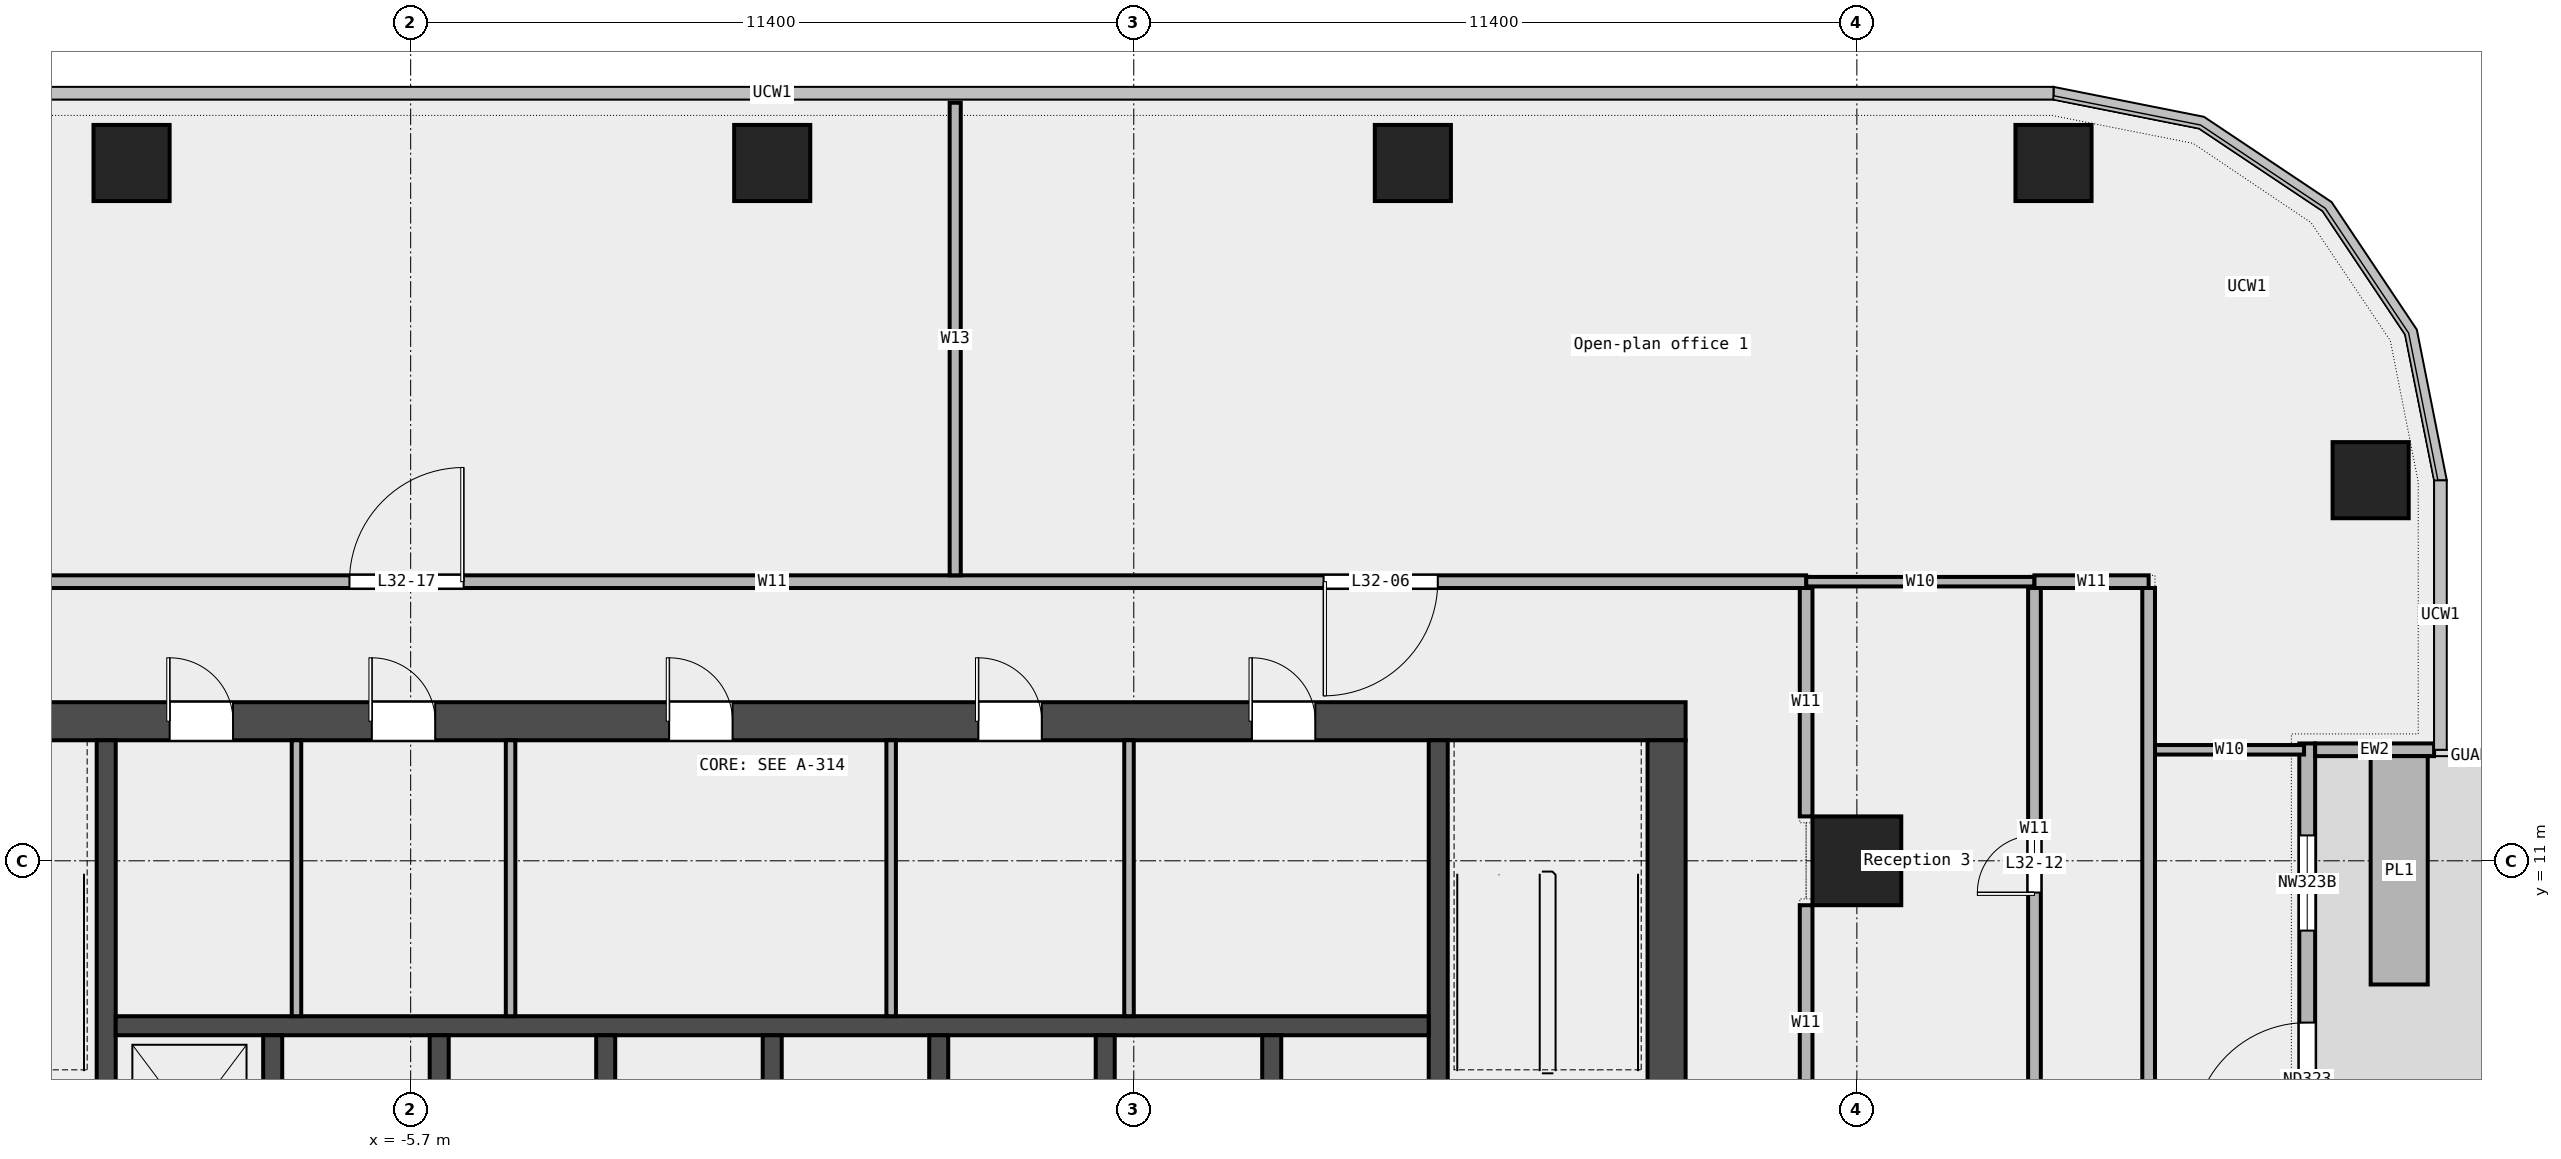
"""IFC4 building model, lengths in metres.
Left out: names, types, materials, properties, quantities, classifications, styles, units other than length and angle.
Written with IfcOpenShell. Run it as: python <this file> out.ifc"""

import sys

from ifc_helpers import new_model, si_unit, direction, frame, frame_2d, origin, origin_2d, place, context, subcontext, project, spatial, rectangle, extrude, element, fill, save


model = new_model("IFC4")
c1 = context("Model", 3, precision=1e-05, world=origin(), true_north=direction((0.0, 1.0)))
c2 = subcontext(c1, "Body", "Model", "MODEL_VIEW")
j1 = project(units=[si_unit("LENGTHUNIT", "METRE"), si_unit("PLANEANGLEUNIT", "RADIAN")], contexts=[c1])
p1 = place(None, origin())
s1 = spatial("IfcSite", under=j1, at=p1, CompositionType="ELEMENT")
p2 = place(p1, origin())
s2 = spatial("IfcBuilding", under=s1, at=p2, CompositionType="ELEMENT")
p3 = place(p2, frame((0.0, 0.0, 161.0)))
s3 = spatial("IfcBuildingStorey", under=s2, at=p3, CompositionType="ELEMENT", Elevation=161.0)
for number, where, z_axis, x_axis in (
    (1, (25.2, 17.0, 0.0), (0.0, 0.0, 1.0), (1.0, 0.0, 0.0)),
    (2, (20.2, 22.0, 0.0), (0.0, 0.0, 1.0), (1.0, 0.0, 0.0)),
    (3, (10.1, 22.0, 0.0), (0.0, 0.0, 1.0), (1.0, 0.0, 0.0)),
    (4, (0.0, 22.0, 0.0), (0.0, 0.0, 1.0), (1.0, 0.0, 0.0)),
    (5, (-10.1, 22.0, 0.0), (0.0, 0.0, 1.0), (1.0, 0.0, 0.0)),
):
    element("IfcColumn", number, at=place(p3, frame(where, z_axis=z_axis, x_axis=x_axis)), inside=s3, PredefinedType="COLUMN", context=c2, shape_type="SweptSolid", body=[
        extrude(rectangle(XDim=1.2, YDim=1.2, at=origin_2d()), origin(), (0.0, 0.0, 1.0), 3.6),
    ])
p4 = place(p3, frame((17.1, 11.0, 0.0), z_axis=(0.0, 0.0, 1.0), x_axis=(1.0, 0.0, 0.0)))
e6 = element("IfcColumn", 6, at=p4, inside=s3, PredefinedType="COLUMN", context=c2, shape_type="SweptSolid", body=[
    extrude(rectangle(XDim=1.4, YDim=1.4, at=origin_2d()), origin(), (0.0, 0.0, 1.0), 3.6),
])
p5 = place(p3, frame((24.2, -0.1, 0.0), z_axis=(0.0, 0.0, 1.0), x_axis=(0.0, 1.0, 0.0)))
e7 = element("IfcWall", 7, at=p5, inside=s3, PredefinedType="STANDARD", context=c2, shape_type="SweptSolid", body=[
    extrude(rectangle(XDim=12.95, YDim=0.25, at=frame_2d((6.475, 0.0))), origin(), (0.0, 0.0, 1.0), 3.6),
])
p6 = place(p5, frame((1.5, 0.0, 0.45)))
e8 = element("IfcOpeningElement", 8, at=p6, cuts=e7, PredefinedType="OPENING", context=c2, shape_type="SweptSolid", body=[
    extrude(rectangle(XDim=1.5, YDim=2.4, at=frame_2d((0.75, 1.2))), frame((0.0, 0.137, 0.0), z_axis=(0.0, -1.0, 0.0), x_axis=(1.0, 0.0, 0.0)), (0.0, 0.0, 1.0), 0.274),
])
p7 = place(p5, frame((6.75, 0.0, 0.0)))
e9 = element("IfcOpeningElement", 9, at=p7, cuts=e7, PredefinedType="OPENING", context=c2, shape_type="SweptSolid", body=[
    extrude(rectangle(XDim=1.8, YDim=2.4, at=frame_2d((0.9, 1.2))), frame((0.0, 0.137, 0.0), z_axis=(0.0, -1.0, 0.0), x_axis=(1.0, 0.0, 0.0)), (0.0, 0.0, 1.0), 0.274),
])
p8 = place(p5, frame((10.0, 0.0, 0.45)))
e10 = element("IfcOpeningElement", 10, at=p8, cuts=e7, PredefinedType="OPENING", context=c2, shape_type="SweptSolid", body=[
    extrude(rectangle(XDim=1.5, YDim=2.4, at=frame_2d((0.75, 1.2))), frame((0.0, 0.137, 0.0), z_axis=(0.0, -1.0, 0.0), x_axis=(1.0, 0.0, 0.0)), (0.0, 0.0, 1.0), 0.274),
])
p9 = place(p3, frame((26.2, 12.75, 0.0), z_axis=(0.0, 0.0, 1.0), x_axis=(-1.0, 0.0, 0.0)))
e11 = element("IfcWall", 11, at=p9, inside=s3, PredefinedType="STANDARD", context=c2, shape_type="SweptSolid", body=[
    extrude(rectangle(XDim=1.875, YDim=0.2, at=frame_2d((0.938, 0.0))), origin(), (0.0, 0.0, 1.0), 3.6),
])
p10 = place(p3, frame((25.65, 9.05, 0.0), z_axis=(0.0, 0.0, 1.0), x_axis=(0.0, 1.0, 0.0)))
e12 = element("IfcWall", 12, at=p10, inside=s3, PredefinedType="STANDARD", context=c2, shape_type="SweptSolid", body=[
    extrude(rectangle(XDim=3.6, YDim=0.9, at=frame_2d((1.8, 0.0))), origin(), (0.0, 0.0, 1.0), 0.7),
])
p11 = place(p3, frame((21.8, 12.75, 0.0), z_axis=(0.0, 0.0, 1.0), x_axis=(1.0, 0.0, 0.0)))
e13 = element("IfcWall", 13, at=p11, inside=s3, PredefinedType="PARTITIONING", context=c2, shape_type="SweptSolid", body=[
    extrude(rectangle(XDim=2.35, YDim=0.15, at=frame_2d((1.175, 0.0))), origin(), (0.0, 0.0, 1.0), 3.6),
])
p12 = place(p3, frame((16.3, 15.4, 0.0), z_axis=(0.0, 0.0, 1.0), x_axis=(1.0, 0.0, 0.0)))
e14 = element("IfcWall", 14, at=p12, inside=s3, PredefinedType="PARTITIONING", context=c2, shape_type="SweptSolid", body=[
    extrude(rectangle(XDim=3.6, YDim=0.15, at=frame_2d((1.8, 0.0))), origin(), (0.0, 0.0, 1.0), 3.6),
])
p13 = place(p3, frame((-16.3, 15.4, 0.0), z_axis=(0.0, 0.0, 1.0), x_axis=(1.0, 0.0, 0.0)))
e15 = element("IfcWall", 15, at=p13, inside=s3, PredefinedType="PARTITIONING", context=c2, shape_type="SweptSolid", body=[
    extrude(rectangle(XDim=32.6, YDim=0.2, at=frame_2d((16.3, 0.0))), origin(), (0.0, 0.0, 1.0), 3.6),
])
p14 = place(p13, frame((24.992, 0.0, 0.0)))
e16 = element("IfcOpeningElement", 16, at=p14, cuts=e15, PredefinedType="OPENING", context=c2, shape_type="SweptSolid", body=[
    extrude(rectangle(XDim=1.8, YDim=2.1, at=frame_2d((0.9, 1.05))), frame((0.0, 0.112, 0.0), z_axis=(0.0, -1.0, 0.0), x_axis=(1.0, 0.0, 0.0)), (0.0, 0.0, 1.0), 0.224),
])
p15 = place(p13, frame((9.635, 0.0, 0.0)))
e17 = element("IfcOpeningElement", 17, at=p15, cuts=e15, PredefinedType="OPENING", context=c2, shape_type="SweptSolid", body=[
    extrude(rectangle(XDim=1.8, YDim=2.1, at=frame_2d((0.9, 1.05))), frame((0.0, 0.112, 0.0), z_axis=(0.0, -1.0, 0.0), x_axis=(1.0, 0.0, 0.0)), (0.0, 0.0, 1.0), 0.224),
])
p16 = place(p3, frame((19.9, 15.4, 0.0), z_axis=(0.0, 0.0, 1.0), x_axis=(1.0, 0.0, 0.0)))
e18 = element("IfcWall", 18, at=p16, inside=s3, PredefinedType="PARTITIONING", context=c2, shape_type="SweptSolid", body=[
    extrude(rectangle(XDim=1.8, YDim=0.2, at=frame_2d((0.9, 0.0))), origin(), (0.0, 0.0, 1.0), 3.6),
])
p17 = place(p3, frame((2.885, 15.5, 0.0), z_axis=(0.0, 0.0, 1.0), x_axis=(0.0, 1.0, 0.0)))
e19 = element("IfcWall", 19, at=p17, inside=s3, PredefinedType="PARTITIONING", context=c2, shape_type="SweptSolid", body=[
    extrude(rectangle(XDim=7.45, YDim=0.175, at=frame_2d((3.725, 0.0))), origin(), (0.0, 0.0, 1.0), 3.6),
])
p18 = place(p3, frame((16.3, 6.6, 0.0), z_axis=(0.0, 0.0, 1.0), x_axis=(0.0, 1.0, 0.0)))
e20 = element("IfcWall", 20, at=p18, inside=s3, PredefinedType="PARTITIONING", context=c2, shape_type="SweptSolid", body=[
    extrude(rectangle(XDim=3.7, YDim=0.2, at=frame_2d((1.85, 0.0))), origin(), (0.0, 0.0, 1.0), 3.6),
])
p19 = place(p3, frame((16.3, 11.7, 0.0), z_axis=(0.0, 0.0, 1.0), x_axis=(0.0, 1.0, 0.0)))
e21 = element("IfcWall", 21, at=p19, inside=s3, PredefinedType="PARTITIONING", context=c2, shape_type="SweptSolid", body=[
    extrude(rectangle(XDim=3.6, YDim=0.2, at=frame_2d((1.8, 0.0))), origin(), (0.0, 0.0, 1.0), 3.6),
])
p20 = place(p3, frame((19.9, 6.6, 0.0), z_axis=(0.0, 0.0, 1.0), x_axis=(0.0, 1.0, 0.0)))
e22 = element("IfcWall", 22, at=p20, inside=s3, PredefinedType="PARTITIONING", context=c2, shape_type="SweptSolid", body=[
    extrude(rectangle(XDim=8.7, YDim=0.2, at=frame_2d((4.35, 0.0))), origin(), (0.0, 0.0, 1.0), 3.6),
])
p21 = place(p20, frame((3.9, 0.0, 0.0)))
e23 = element("IfcOpeningElement", 23, at=p21, cuts=e22, PredefinedType="OPENING", context=c2, shape_type="SweptSolid", body=[
    extrude(rectangle(XDim=0.9, YDim=2.1, at=frame_2d((0.45, 1.05))), frame((0.0, 0.112, 0.0), z_axis=(0.0, -1.0, 0.0), x_axis=(1.0, 0.0, 0.0)), (0.0, 0.0, 1.0), 0.224),
])
p22 = place(p3, frame((21.7, -9.0, 0.0), z_axis=(0.0, 0.0, 1.0), x_axis=(0.0, 1.0, 0.0)))
e24 = element("IfcWall", 24, at=p22, inside=s3, PredefinedType="PARTITIONING", context=c2, shape_type="SweptSolid", body=[
    extrude(rectangle(XDim=24.3, YDim=0.2, at=frame_2d((12.15, 0.0))), origin(), (0.0, 0.0, 1.0), 3.6),
])
p23 = place(p22, frame((14.925, 0.0, 0.0)))
e25 = element("IfcOpeningElement", 25, at=p23, cuts=e24, PredefinedType="OPENING", context=c2, shape_type="SweptSolid", body=[
    extrude(rectangle(XDim=0.9, YDim=2.1, at=frame_2d((0.45, 1.05))), frame((0.0, 0.112, 0.0), z_axis=(0.0, -1.0, 0.0), x_axis=(1.0, 0.0, 0.0)), (0.0, 0.0, 1.0), 0.224),
])
p24 = place(p22, frame((2.562, 0.0, 0.0)))
e26 = element("IfcOpeningElement", 26, at=p24, cuts=e24, PredefinedType="OPENING", context=c2, shape_type="SweptSolid", body=[
    extrude(rectangle(XDim=0.9, YDim=2.1, at=frame_2d((0.45, 1.05))), frame((0.0, 0.112, 0.0), z_axis=(0.0, -1.0, 0.0), x_axis=(1.0, 0.0, 0.0)), (0.0, 0.0, 1.0), 0.224),
])
p25 = place(p3, frame((-14.4, 13.2, 0.0), z_axis=(0.0, 0.0, 1.0), x_axis=(1.0, 0.0, 0.0)))
e27 = element("IfcWall", 27, at=p25, inside=s3, PredefinedType="SHEAR", context=c2, shape_type="SweptSolid", body=[
    extrude(rectangle(XDim=28.8, YDim=0.6, at=frame_2d((14.4, 0.0))), origin(), (0.0, 0.0, 1.0), 3.7),
])
p26 = place(p25, frame((4.9, 0.0, 0.0)))
e28 = element("IfcOpeningElement", 28, at=p26, cuts=e27, PredefinedType="OPENING", context=c2, shape_type="SweptSolid", body=[
    extrude(rectangle(XDim=1.0, YDim=2.1, at=frame_2d((0.5, 1.05))), frame((0.0, 0.312, 0.0), z_axis=(0.0, -1.0, 0.0), x_axis=(1.0, 0.0, 0.0)), (0.0, 0.0, 1.0), 0.624),
])
p27 = place(p25, frame((8.087, 0.0, 0.0)))
e29 = element("IfcOpeningElement", 29, at=p27, cuts=e27, PredefinedType="OPENING", context=c2, shape_type="SweptSolid", body=[
    extrude(rectangle(XDim=1.0, YDim=2.1, at=frame_2d((0.5, 1.05))), frame((0.0, 0.312, 0.0), z_axis=(0.0, -1.0, 0.0), x_axis=(1.0, 0.0, 0.0)), (0.0, 0.0, 1.0), 0.624),
])
p28 = place(p25, frame((12.775, 0.0, 0.0)))
e30 = element("IfcOpeningElement", 30, at=p28, cuts=e27, PredefinedType="OPENING", context=c2, shape_type="SweptSolid", body=[
    extrude(rectangle(XDim=1.0, YDim=2.1, at=frame_2d((0.5, 1.05))), frame((0.0, 0.312, 0.0), z_axis=(0.0, -1.0, 0.0), x_axis=(1.0, 0.0, 0.0)), (0.0, 0.0, 1.0), 0.624),
])
p29 = place(p25, frame((17.65, 0.0, 0.0)))
e31 = element("IfcOpeningElement", 31, at=p29, cuts=e27, PredefinedType="OPENING", context=c2, shape_type="SweptSolid", body=[
    extrude(rectangle(XDim=1.0, YDim=2.1, at=frame_2d((0.5, 1.05))), frame((0.0, 0.312, 0.0), z_axis=(0.0, -1.0, 0.0), x_axis=(1.0, 0.0, 0.0)), (0.0, 0.0, 1.0), 0.624),
])
p30 = place(p25, frame((21.962, 0.0, 0.0)))
e32 = element("IfcOpeningElement", 32, at=p30, cuts=e27, PredefinedType="OPENING", context=c2, shape_type="SweptSolid", body=[
    extrude(rectangle(XDim=1.0, YDim=2.1, at=frame_2d((0.5, 1.05))), frame((0.0, 0.312, 0.0), z_axis=(0.0, -1.0, 0.0), x_axis=(1.0, 0.0, 0.0)), (0.0, 0.0, 1.0), 0.624),
])
p31 = place(p3, frame((14.1, -6.6, 0.0), z_axis=(0.0, 0.0, 1.0), x_axis=(0.0, 1.0, 0.0)))
e33 = element("IfcWall", 33, at=p31, inside=s3, PredefinedType="SHEAR", context=c2, shape_type="SweptSolid", body=[
    extrude(rectangle(XDim=19.5, YDim=0.6, at=frame_2d((9.75, 0.0))), origin(), (0.0, 0.0, 1.0), 3.7),
])
p32 = place(p31, frame((9.3, 0.0, 0.0)))
e34 = element("IfcOpeningElement", 34, at=p32, cuts=e33, PredefinedType="OPENING", context=c2, shape_type="SweptSolid", body=[
    extrude(rectangle(XDim=1.8, YDim=2.1, at=frame_2d((0.9, 1.05))), frame((0.0, 0.312, 0.0), z_axis=(0.0, -1.0, 0.0), x_axis=(1.0, 0.0, 0.0)), (0.0, 0.0, 1.0), 0.624),
])
for number, where, z_axis, x_axis in (
    (35, (-10.5, 5.25, 0.0), (0.0, 0.0, 1.0), (0.0, 1.0, 0.0)),
    (36, (10.5, 5.25, 0.0), (0.0, 0.0, 1.0), (0.0, 1.0, 0.0)),
):
    element("IfcWall", number, at=place(p3, frame(where, z_axis=z_axis, x_axis=x_axis)), inside=s3, PredefinedType="SHEAR", context=c2, shape_type="SweptSolid", body=[
        extrude(rectangle(XDim=7.65, YDim=0.3, at=frame_2d((3.825, 0.0))), origin(), (0.0, 0.0, 1.0), 3.7),
    ])
p33 = place(p3, frame((-10.35, 8.4, 0.0), z_axis=(0.0, 0.0, 1.0), x_axis=(1.0, 0.0, 0.0)))
e37 = element("IfcWall", 37, at=p33, inside=s3, PredefinedType="SOLIDWALL", context=c2, shape_type="SweptSolid", body=[
    extrude(rectangle(XDim=20.7, YDim=0.3, at=frame_2d((10.35, 0.0))), origin(), (0.0, 0.0, 1.0), 3.7),
])
for number, where, z_axis, x_axis in (
    (38, (-7.875, 5.55, 0.0), (0.0, 0.0, 1.0), (0.0, 1.0, 0.0)),
    (39, (-5.25, 5.55, 0.0), (0.0, 0.0, 1.0), (0.0, 1.0, 0.0)),
    (40, (-2.625, 5.55, 0.0), (0.0, 0.0, 1.0), (0.0, 1.0, 0.0)),
    (41, (0.0, 5.55, 0.0), (0.0, 0.0, 1.0), (0.0, 1.0, 0.0)),
    (42, (2.625, 5.55, 0.0), (0.0, 0.0, 1.0), (0.0, 1.0, 0.0)),
    (43, (5.25, 5.55, 0.0), (0.0, 0.0, 1.0), (0.0, 1.0, 0.0)),
    (44, (7.875, 5.55, 0.0), (0.0, 0.0, 1.0), (0.0, 1.0, 0.0)),
):
    element("IfcWall", number, at=place(p3, frame(where, z_axis=z_axis, x_axis=x_axis)), inside=s3, PredefinedType="SOLIDWALL", context=c2, shape_type="SweptSolid", body=[
        extrude(rectangle(XDim=2.7, YDim=0.3, at=frame_2d((1.35, 0.0))), origin(), (0.0, 0.0, 1.0), 3.7),
    ])
for number, where, z_axis, x_axis in (
    (45, (-7.5, 8.55, 0.0), (0.0, 0.0, 1.0), (0.0, 1.0, 0.0)),
    (46, (-4.125, 8.55, 0.0), (0.0, 0.0, 1.0), (0.0, 1.0, 0.0)),
    (47, (1.875, 8.55, 0.0), (0.0, 0.0, 1.0), (0.0, 1.0, 0.0)),
    (48, (5.625, 8.55, 0.0), (0.0, 0.0, 1.0), (0.0, 1.0, 0.0)),
):
    element("IfcWall", number, at=place(p3, frame(where, z_axis=z_axis, x_axis=x_axis)), inside=s3, PredefinedType="PARTITIONING", context=c2, shape_type="SweptSolid", body=[
        extrude(rectangle(XDim=4.35, YDim=0.15, at=frame_2d((2.175, 0.0))), origin(), (0.0, 0.0, 1.0), 3.7),
    ])
p34 = place(p7, origin())
e49 = element("IfcDoor", 49, at=p34, inside=s3, OperationType="DOUBLE_DOOR_SINGLE_SWING", PredefinedType="DOOR", context=c2, shape_type="SweptSolid", body=[
    extrude(rectangle(XDim=1.8, YDim=2.4, at=frame_2d((0.9, 1.2))), frame((0.0, 0.025, 0.0), z_axis=(0.0, -1.0, 0.0), x_axis=(1.0, 0.0, 0.0)), (0.0, 0.0, 1.0), 0.05),
])
fill(e9, e49)
p35 = place(p8, origin())
e50 = element("IfcWindow", 50, at=p35, inside=s3, PartitioningType="SINGLE_PANEL", PredefinedType="WINDOW", context=c2, shape_type="SweptSolid", body=[
    extrude(rectangle(XDim=1.5, YDim=2.4, at=frame_2d((0.75, 1.2))), frame((0.0, 0.03, 0.0), z_axis=(0.0, -1.0, 0.0), x_axis=(1.0, 0.0, 0.0)), (0.0, 0.0, 1.0), 0.06),
])
fill(e10, e50)
p36 = place(p14, origin())
e51 = element("IfcDoor", 51, at=p36, inside=s3, OperationType="DOUBLE_DOOR_SINGLE_SWING", PredefinedType="DOOR", context=c2, shape_type="SweptSolid", body=[
    extrude(rectangle(XDim=1.8, YDim=2.1, at=frame_2d((0.9, 1.05))), frame((0.0, 0.025, 0.0), z_axis=(0.0, -1.0, 0.0), x_axis=(1.0, 0.0, 0.0)), (0.0, 0.0, 1.0), 0.05),
])
fill(e16, e51)
p37 = place(p21, origin())
e52 = element("IfcDoor", 52, at=p37, inside=s3, OperationType="SINGLE_SWING_LEFT", PredefinedType="DOOR", context=c2, shape_type="SweptSolid", body=[
    extrude(rectangle(XDim=0.9, YDim=2.1, at=frame_2d((0.45, 1.05))), frame((0.0, 0.025, 0.0), z_axis=(0.0, -1.0, 0.0), x_axis=(1.0, 0.0, 0.0)), (0.0, 0.0, 1.0), 0.05),
])
fill(e23, e52)
p38 = place(p15, origin())
e53 = element("IfcDoor", 53, at=p38, inside=s3, OperationType="DOUBLE_DOOR_SINGLE_SWING", PredefinedType="DOOR", context=c2, shape_type="SweptSolid", body=[
    extrude(rectangle(XDim=1.8, YDim=2.1, at=frame_2d((0.9, 1.05))), frame((0.0, 0.025, 0.0), z_axis=(0.0, -1.0, 0.0), x_axis=(1.0, 0.0, 0.0)), (0.0, 0.0, 1.0), 0.05),
])
fill(e17, e53)
p39 = place(p26, origin())
e54 = element("IfcDoor", 54, at=p39, inside=s3, OperationType="SINGLE_SWING_LEFT", PredefinedType="DOOR", context=c2, shape_type="SweptSolid", body=[
    extrude(rectangle(XDim=1.0, YDim=2.1, at=frame_2d((0.5, 1.05))), frame((0.0, 0.025, 0.0), z_axis=(0.0, -1.0, 0.0), x_axis=(1.0, 0.0, 0.0)), (0.0, 0.0, 1.0), 0.05),
])
fill(e28, e54)
p40 = place(p27, origin())
e55 = element("IfcDoor", 55, at=p40, inside=s3, OperationType="SINGLE_SWING_LEFT", PredefinedType="DOOR", context=c2, shape_type="SweptSolid", body=[
    extrude(rectangle(XDim=1.0, YDim=2.1, at=frame_2d((0.5, 1.05))), frame((0.0, 0.025, 0.0), z_axis=(0.0, -1.0, 0.0), x_axis=(1.0, 0.0, 0.0)), (0.0, 0.0, 1.0), 0.05),
])
fill(e29, e55)
p41 = place(p28, origin())
e56 = element("IfcDoor", 56, at=p41, inside=s3, OperationType="SINGLE_SWING_LEFT", PredefinedType="DOOR", context=c2, shape_type="SweptSolid", body=[
    extrude(rectangle(XDim=1.0, YDim=2.1, at=frame_2d((0.5, 1.05))), frame((0.0, 0.025, 0.0), z_axis=(0.0, -1.0, 0.0), x_axis=(1.0, 0.0, 0.0)), (0.0, 0.0, 1.0), 0.05),
])
fill(e30, e56)
p42 = place(p29, origin())
e57 = element("IfcDoor", 57, at=p42, inside=s3, OperationType="SINGLE_SWING_LEFT", PredefinedType="DOOR", context=c2, shape_type="SweptSolid", body=[
    extrude(rectangle(XDim=1.0, YDim=2.1, at=frame_2d((0.5, 1.05))), frame((0.0, 0.025, 0.0), z_axis=(0.0, -1.0, 0.0), x_axis=(1.0, 0.0, 0.0)), (0.0, 0.0, 1.0), 0.05),
])
fill(e31, e57)
p43 = place(p30, origin())
e58 = element("IfcDoor", 58, at=p43, inside=s3, OperationType="SINGLE_SWING_LEFT", PredefinedType="DOOR", context=c2, shape_type="SweptSolid", body=[
    extrude(rectangle(XDim=1.0, YDim=2.1, at=frame_2d((0.5, 1.05))), frame((0.0, 0.025, 0.0), z_axis=(0.0, -1.0, 0.0), x_axis=(1.0, 0.0, 0.0)), (0.0, 0.0, 1.0), 0.05),
])
fill(e32, e58)
save(model, sys.argv[1])
